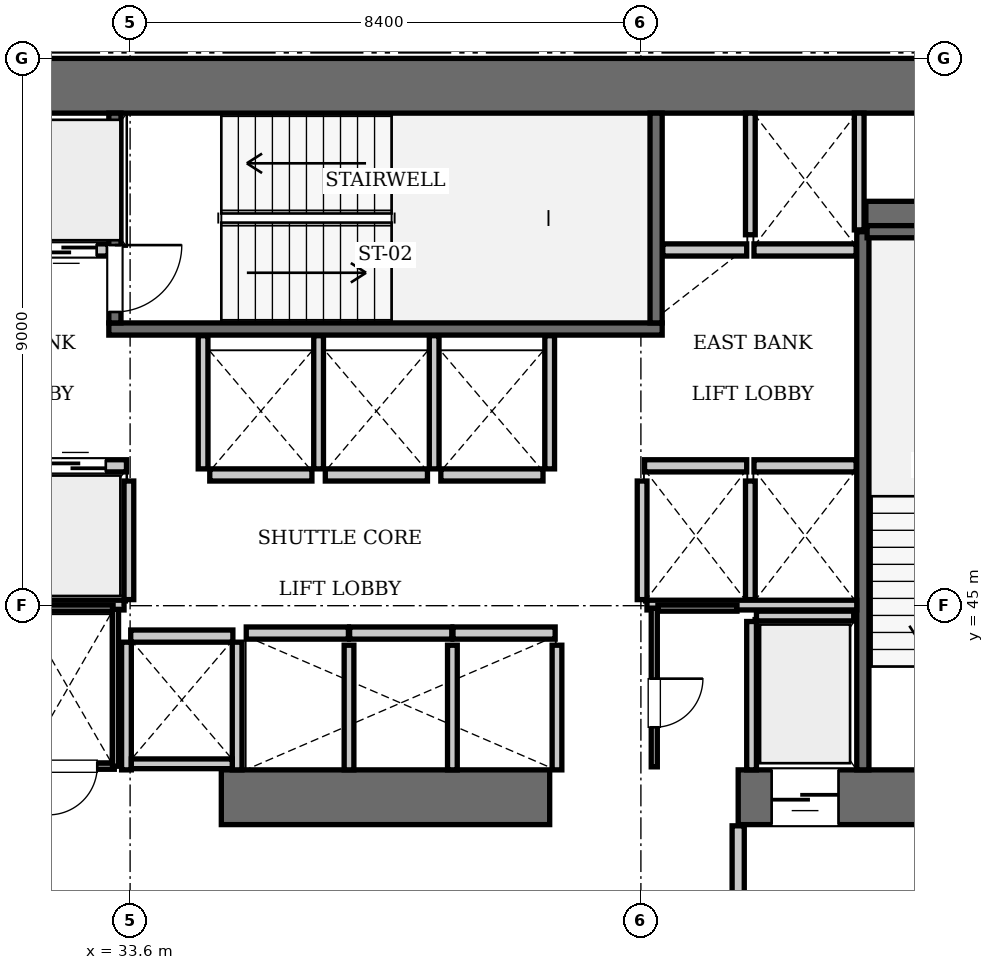
"""IFC4 building model, lengths in metres.
Left out: names, types, materials, properties, quantities, classifications, styles, units other than length and angle.
Written with IfcOpenShell. Run it as: python <this file> out.ifc"""

import sys

from ifc_helpers import new_model, si_unit, direction, frame, frame_2d, origin, place, context, subcontext, project, spatial, rectangle, extrude, element, fill, save


model = new_model("IFC4")
c1 = context("Model", 3, precision=1e-05, world=origin(), true_north=direction((0.0, 1.0)))
c2 = subcontext(c1, "Body", "Model", "MODEL_VIEW")
j1 = project(units=[si_unit("LENGTHUNIT", "METRE"), si_unit("PLANEANGLEUNIT", "RADIAN")], contexts=[c1])
p1 = place(None, origin())
s1 = spatial("IfcSite", under=j1, at=p1, CompositionType="ELEMENT")
p2 = place(p1, origin())
s2 = spatial("IfcBuilding", under=s1, at=p2, CompositionType="ELEMENT")
p3 = place(p2, frame((0.0, 0.0, 103.95)))
s3 = spatial("IfcBuildingStorey", under=s2, at=p3, CompositionType="ELEMENT", Elevation=103.95)
p4 = place(p3, frame((25.2, 53.55, 0.0), z_axis=(0.0, 0.0, 1.0), x_axis=(1.0, 0.0, 0.0)))
e1 = element("IfcWall", 1, at=p4, inside=s3, PredefinedType="SHEAR", context=c2, shape_type="SweptSolid", body=[
    extrude(rectangle(XDim=25.2, YDim=0.9, at=frame_2d((12.6, 0.0))), origin(), (0.0, 0.0, 1.0), 3.85),
])
p5 = place(p3, frame((35.1, 41.85, 0.0), z_axis=(0.0, 0.0, 1.0), x_axis=(1.0, 0.0, 0.0)))
e2 = element("IfcWall", 2, at=p5, inside=s3, PredefinedType="SHEAR", context=c2, shape_type="SweptSolid", body=[
    extrude(rectangle(XDim=5.4, YDim=0.9, at=frame_2d((2.7, 0.0))), origin(), (0.0, 0.0, 1.0), 3.85),
])
p6 = place(p3, frame((43.6, 41.85, 0.0), z_axis=(0.0, 0.0, 1.0), x_axis=(1.0, 0.0, 0.0)))
e3 = element("IfcWall", 3, at=p6, inside=s3, PredefinedType="SHEAR", context=c2, shape_type="SweptSolid", body=[
    extrude(rectangle(XDim=6.8, YDim=0.9, at=frame_2d((3.4, 0.0))), origin(), (0.0, 0.0, 1.0), 3.85),
])
p7 = place(p6, frame((3.9, 0.0, 0.0)))
e4 = element("IfcOpeningElement", 4, at=p7, cuts=e3, PredefinedType="OPENING", context=c2, shape_type="SweptSolid", body=[
    extrude(rectangle(XDim=1.15, YDim=2.15, at=frame_2d((0.575, 1.075))), frame((0.0, 0.46, 0.0), z_axis=(0.0, -1.0, 0.0), x_axis=(1.0, 0.0, 0.0)), (0.0, 0.0, 1.0), 0.92),
])
p8 = place(p6, frame((0.55, 0.0, 0.0)))
e5 = element("IfcOpeningElement", 5, at=p8, cuts=e3, PredefinedType="OPENING", context=c2, shape_type="SweptSolid", body=[
    extrude(rectangle(XDim=1.1, YDim=2.2, at=frame_2d((0.55, 1.1))), frame((0.0, 0.46, 0.0), z_axis=(0.0, -1.0, 0.0), x_axis=(1.0, 0.0, 0.0)), (0.0, 0.0, 1.0), 0.92),
])
p9 = place(p3, frame((45.7, 51.4, 0.0), z_axis=(0.0, 0.0, 1.0), x_axis=(1.0, 0.0, 0.0)))
e6 = element("IfcWall", 6, at=p9, inside=s3, PredefinedType="SHEAR", context=c2, shape_type="SweptSolid", body=[
    extrude(rectangle(XDim=3.8, YDim=0.5, at=frame_2d((1.9, 0.0))), origin(), (0.0, 0.0, 1.0), 3.85),
])
p10 = place(p3, frame((33.25, 49.55, 0.0), z_axis=(0.0, 0.0, 1.0), x_axis=(1.0, 0.0, 0.0)))
e7 = element("IfcWall", 7, at=p10, inside=s3, PredefinedType="SOLIDWALL", context=c2, shape_type="SweptSolid", body=[
    extrude(rectangle(XDim=9.1, YDim=0.2, at=frame_2d((4.55, 0.0))), origin(), (0.0, 0.0, 1.0), 3.61),
])
p11 = place(p3, frame((42.25, 49.65, 0.0), z_axis=(0.0, 0.0, 1.0), x_axis=(0.0, 1.0, 0.0)))
e8 = element("IfcWall", 8, at=p11, inside=s3, PredefinedType="SOLIDWALL", context=c2, shape_type="SweptSolid", body=[
    extrude(rectangle(XDim=3.45, YDim=0.2, at=frame_2d((1.725, 0.0))), origin(), (0.0, 0.0, 1.0), 3.61),
])
p12 = place(p3, frame((33.35, 49.65, 0.0), z_axis=(0.0, 0.0, 1.0), x_axis=(0.0, 1.0, 0.0)))
e9 = element("IfcWall", 9, at=p12, inside=s3, PredefinedType="SOLIDWALL", context=c2, shape_type="SweptSolid", body=[
    extrude(rectangle(XDim=3.45, YDim=0.2, at=frame_2d((1.725, 0.0))), origin(), (0.0, 0.0, 1.0), 3.61),
])
p13 = place(p12, frame((0.18, 0.0, 0.0)))
e10 = element("IfcOpeningElement", 10, at=p13, cuts=e9, PredefinedType="OPENING", context=c2, shape_type="SweptSolid", body=[
    extrude(rectangle(XDim=1.1, YDim=2.15, at=frame_2d((0.55, 1.075))), frame((0.0, 0.11, 0.0), z_axis=(0.0, -1.0, 0.0), x_axis=(1.0, 0.0, 0.0)), (0.0, 0.0, 1.0), 0.22),
])
p14 = place(p3, frame((45.65, 42.3, 0.0), z_axis=(0.0, 0.0, 1.0), x_axis=(0.0, 1.0, 0.0)))
e11 = element("IfcWall", 11, at=p14, inside=s3, PredefinedType="SOLIDWALL", context=c2, shape_type="SweptSolid", body=[
    extrude(rectangle(XDim=8.85, YDim=0.2, at=frame_2d((4.425, 0.0))), origin(), (0.0, 0.0, 1.0), 3.61),
])
p15 = place(p3, frame((45.72, 51.15, 0.0), z_axis=(0.0, 0.0, 1.0), x_axis=(1.0, 0.0, 0.0)))
e12 = element("IfcWall", 12, at=p15, inside=s3, PredefinedType="SOLIDWALL", context=c2, shape_type="SweptSolid", body=[
    extrude(rectangle(XDim=3.5, YDim=0.2, at=frame_2d((1.75, 0.0))), origin(), (0.0, 0.0, 1.0), 3.61),
])
p16 = place(p3, frame((31.86, 47.3, 0.0), z_axis=(0.0, 0.0, 1.0), x_axis=(1.0, 0.0, 0.0)))
e13 = element("IfcWall", 13, at=p16, inside=s3, PredefinedType="SOLIDWALL", context=c2, shape_type="SweptSolid", body=[
    extrude(rectangle(XDim=1.68, YDim=0.2, at=frame_2d((0.84, 0.0))), origin(), (0.0, 0.0, 1.0), 3.61),
])
p17 = place(p16, frame((0.34, 0.0, 0.0)))
e14 = element("IfcOpeningElement", 14, at=p17, cuts=e13, PredefinedType="OPENING", context=c2, shape_type="SweptSolid", body=[
    extrude(rectangle(XDim=1.0, YDim=2.15, at=frame_2d((0.5, 1.075))), frame((0.0, 0.11, 0.0), z_axis=(0.0, -1.0, 0.0), x_axis=(1.0, 0.0, 0.0)), (0.0, 0.0, 1.0), 0.22),
])
p18 = place(p3, frame((31.86, 50.85, 0.0), z_axis=(0.0, 0.0, 1.0), x_axis=(1.0, 0.0, 0.0)))
e15 = element("IfcWall", 15, at=p18, inside=s3, PredefinedType="SOLIDWALL", context=c2, shape_type="SweptSolid", body=[
    extrude(rectangle(XDim=1.38, YDim=0.2, at=frame_2d((0.69, 0.0))), origin(), (0.0, 0.0, 1.0), 3.61),
])
p19 = place(p18, frame((0.19, 0.0, 0.0)))
e16 = element("IfcOpeningElement", 16, at=p19, cuts=e15, PredefinedType="OPENING", context=c2, shape_type="SweptSolid", body=[
    extrude(rectangle(XDim=1.0, YDim=2.15, at=frame_2d((0.5, 1.075))), frame((0.0, 0.11, 0.0), z_axis=(0.0, -1.0, 0.0), x_axis=(1.0, 0.0, 0.0)), (0.0, 0.0, 1.0), 0.22),
])
for number, where, z_axis, x_axis in (
    (17, (42.06, 47.3, 0.0), (0.0, 0.0, 1.0), (1.0, 0.0, 0.0)),
    (18, (43.86, 47.3, 0.0), (0.0, 0.0, 1.0), (1.0, 0.0, 0.0)),
):
    element("IfcWall", number, at=place(p3, frame(where, z_axis=z_axis, x_axis=x_axis)), inside=s3, PredefinedType="SOLIDWALL", context=c2, shape_type="SweptSolid", body=[
        extrude(rectangle(XDim=1.68, YDim=0.2, at=frame_2d((0.84, 0.0))), origin(), (0.0, 0.0, 1.0), 3.61),
    ])
p20 = place(p3, frame((42.36, 50.85, 0.0), z_axis=(0.0, 0.0, 1.0), x_axis=(1.0, 0.0, 0.0)))
e19 = element("IfcWall", 19, at=p20, inside=s3, PredefinedType="SOLIDWALL", context=c2, shape_type="SweptSolid", body=[
    extrude(rectangle(XDim=1.38, YDim=0.2, at=frame_2d((0.69, 0.0))), origin(), (0.0, 0.0, 1.0), 3.61),
])
for number, where, z_axis, x_axis in (
    (20, (43.86, 50.85, 0.0), (0.0, 0.0, 1.0), (1.0, 0.0, 0.0)),
    (21, (35.51, 44.55, 0.0), (0.0, 0.0, 1.0), (1.0, 0.0, 0.0)),
    (22, (37.21, 44.55, 0.0), (0.0, 0.0, 1.0), (1.0, 0.0, 0.0)),
):
    element("IfcWall", number, at=place(p3, frame(where, z_axis=z_axis, x_axis=x_axis)), inside=s3, PredefinedType="SOLIDWALL", context=c2, shape_type="SweptSolid", body=[
        extrude(rectangle(XDim=1.68, YDim=0.2, at=frame_2d((0.84, 0.0))), origin(), (0.0, 0.0, 1.0), 3.61),
    ])
for number, where, z_axis, x_axis in (
    (23, (38.91, 44.55, 0.0), (0.0, 0.0, 1.0), (1.0, 0.0, 0.0)),
    (24, (34.91, 47.15, 0.0), (0.0, 0.0, 1.0), (1.0, 0.0, 0.0)),
):
    element("IfcWall", number, at=place(p3, frame(where, z_axis=z_axis, x_axis=x_axis)), inside=s3, PredefinedType="SOLIDWALL", context=c2, shape_type="SweptSolid", body=[
        extrude(rectangle(XDim=1.68, YDim=0.2, at=frame_2d((0.84, 0.0))), origin(), (0.0, 0.0, 1.0), 3.61),
    ])
for number, where, z_axis, x_axis in (
    (25, (36.81, 47.15, 0.0), (0.0, 0.0, 1.0), (1.0, 0.0, 0.0)),
    (26, (38.71, 47.15, 0.0), (0.0, 0.0, 1.0), (1.0, 0.0, 0.0)),
    (27, (33.61, 44.5, 0.0), (0.0, 0.0, 1.0), (1.0, 0.0, 0.0)),
):
    element("IfcWall", number, at=place(p3, frame(where, z_axis=z_axis, x_axis=x_axis)), inside=s3, PredefinedType="SOLIDWALL", context=c2, shape_type="SweptSolid", body=[
        extrude(rectangle(XDim=1.68, YDim=0.2, at=frame_2d((0.84, 0.0))), origin(), (0.0, 0.0, 1.0), 3.61),
    ])
p21 = place(p3, frame((43.9, 44.83, 0.0), z_axis=(0.0, 0.0, 1.0), x_axis=(1.0, 0.0, 0.0)))
e28 = element("IfcWall", 28, at=p21, inside=s3, PredefinedType="SOLIDWALL", context=c2, shape_type="SweptSolid", body=[
    extrude(rectangle(XDim=1.6, YDim=0.16, at=frame_2d((0.8, 0.0))), origin(), (0.0, 0.0, 1.0), 3.61),
])
p22 = place(p3, frame((43.82, 42.3, 0.0), z_axis=(0.0, 0.0, 1.0), x_axis=(0.0, 1.0, 0.0)))
e29 = element("IfcWall", 29, at=p22, inside=s3, PredefinedType="SOLIDWALL", context=c2, shape_type="SweptSolid", body=[
    extrude(rectangle(XDim=2.44, YDim=0.16, at=frame_2d((1.22, 0.0))), origin(), (0.0, 0.0, 1.0), 3.61),
])
p23 = place(p3, frame((33.58, 45.1, 0.0), z_axis=(0.0, 0.0, 1.0), x_axis=(0.0, 1.0, 0.0)))
e30 = element("IfcWall", 30, at=p23, inside=s3, PredefinedType="SOLIDWALL", context=c2, shape_type="SweptSolid", body=[
    extrude(rectangle(XDim=1.95, YDim=0.16, at=frame_2d((0.975, 0.0))), origin(), (0.0, 0.0, 1.0), 3.61),
])
p24 = place(p3, frame((30.05, 45.01, 0.0), z_axis=(0.0, 0.0, 1.0), x_axis=(1.0, 0.0, 0.0)))
e31 = element("IfcWall", 31, at=p24, inside=s3, PredefinedType="SOLIDWALL", context=c2, shape_type="SweptSolid", body=[
    extrude(rectangle(XDim=3.45, YDim=0.16, at=frame_2d((1.725, 0.0))), origin(), (0.0, 0.0, 1.0), 3.61),
])
for number, where, z_axis, x_axis in (
    (32, (42.02, 45.1, 0.0), (0.0, 0.0, 1.0), (0.0, 1.0, 0.0)),
    (33, (43.8, 45.1, 0.0), (0.0, 0.0, 1.0), (0.0, 1.0, 0.0)),
):
    element("IfcWall", number, at=place(p3, frame(where, z_axis=z_axis, x_axis=x_axis)), inside=s3, PredefinedType="SOLIDWALL", context=c2, shape_type="SweptSolid", body=[
        extrude(rectangle(XDim=1.95, YDim=0.16, at=frame_2d((0.975, 0.0))), origin(), (0.0, 0.0, 1.0), 3.61),
    ])
p25 = place(p3, frame((42.1, 45.01, 0.0), z_axis=(0.0, 0.0, 1.0), x_axis=(1.0, 0.0, 0.0)))
e34 = element("IfcWall", 34, at=p25, inside=s3, PredefinedType="SOLIDWALL", context=c2, shape_type="SweptSolid", body=[
    extrude(rectangle(XDim=3.45, YDim=0.16, at=frame_2d((1.725, 0.0))), origin(), (0.0, 0.0, 1.0), 3.61),
])
p26 = place(p3, frame((45.59, 51.18, 0.0), z_axis=(0.0, 0.0, 1.0), x_axis=(0.0, 1.0, 0.0)))
e35 = element("IfcWall", 35, at=p26, inside=s3, PredefinedType="SOLIDWALL", context=c2, shape_type="SweptSolid", body=[
    extrude(rectangle(XDim=1.92, YDim=0.16, at=frame_2d((0.96, 0.0))), origin(), (0.0, 0.0, 1.0), 3.61),
])
p27 = place(p3, frame((43.8, 51.1, 0.0), z_axis=(0.0, 0.0, 1.0), x_axis=(0.0, 1.0, 0.0)))
e36 = element("IfcWall", 36, at=p27, inside=s3, PredefinedType="SOLIDWALL", context=c2, shape_type="SweptSolid", body=[
    extrude(rectangle(XDim=2.0, YDim=0.16, at=frame_2d((1.0, 0.0))), origin(), (0.0, 0.0, 1.0), 3.61),
])
for number, where, z_axis, x_axis in (
    (37, (37.2, 42.3, 0.0), (0.0, 0.0, 1.0), (0.0, 1.0, 0.0)),
    (38, (38.9, 42.3, 0.0), (0.0, 0.0, 1.0), (0.0, 1.0, 0.0)),
    (39, (40.62, 42.3, 0.0), (0.0, 0.0, 1.0), (0.0, 1.0, 0.0)),
):
    element("IfcWall", number, at=place(p3, frame(where, z_axis=z_axis, x_axis=x_axis)), inside=s3, PredefinedType="SOLIDWALL", context=c2, shape_type="SweptSolid", body=[
        extrude(rectangle(XDim=2.05, YDim=0.16, at=frame_2d((1.025, 0.0))), origin(), (0.0, 0.0, 1.0), 3.61),
    ])
for number, where, z_axis, x_axis in (
    (40, (34.8, 47.25, 0.0), (0.0, 0.0, 1.0), (0.0, 1.0, 0.0)),
    (41, (36.7, 47.25, 0.0), (0.0, 0.0, 1.0), (0.0, 1.0, 0.0)),
    (42, (38.6, 47.25, 0.0), (0.0, 0.0, 1.0), (0.0, 1.0, 0.0)),
    (43, (40.5, 47.25, 0.0), (0.0, 0.0, 1.0), (0.0, 1.0, 0.0)),
):
    element("IfcWall", number, at=place(p3, frame(where, z_axis=z_axis, x_axis=x_axis)), inside=s3, PredefinedType="SOLIDWALL", context=c2, shape_type="SweptSolid", body=[
        extrude(rectangle(XDim=2.19, YDim=0.16, at=frame_2d((1.095, 0.0))), origin(), (0.0, 0.0, 1.0), 3.61),
    ])
for number, where, z_axis, x_axis in (
    (44, (33.54, 42.3, 0.0), (0.0, 0.0, 1.0), (0.0, 1.0, 0.0)),
    (45, (35.36, 42.3, 0.0), (0.0, 0.0, 1.0), (0.0, 1.0, 0.0)),
):
    element("IfcWall", number, at=place(p3, frame(where, z_axis=z_axis, x_axis=x_axis)), inside=s3, PredefinedType="SOLIDWALL", context=c2, shape_type="SweptSolid", body=[
        extrude(rectangle(XDim=2.1, YDim=0.16, at=frame_2d((1.05, 0.0))), origin(), (0.0, 0.0, 1.0), 3.61),
    ])
p28 = place(p3, frame((33.62, 42.4, 0.0), z_axis=(0.0, 0.0, 1.0), x_axis=(1.0, 0.0, 0.0)))
e46 = element("IfcWall", 46, at=p28, inside=s3, PredefinedType="SOLIDWALL", context=c2, shape_type="SweptSolid", body=[
    extrude(rectangle(XDim=1.66, YDim=0.16, at=frame_2d((0.83, 0.0))), origin(), (0.0, 0.0, 1.0), 3.61),
])
p29 = place(p3, frame((43.6, 38.31, 0.0), z_axis=(0.0, 0.0, 1.0), x_axis=(0.0, 1.0, 0.0)))
e47 = element("IfcWall", 47, at=p29, inside=s3, PredefinedType="PARTITIONING", context=c2, shape_type="SweptSolid", body=[
    extrude(rectangle(XDim=3.07, YDim=0.2, at=frame_2d((1.535, 0.0))), origin(), (0.0, 0.0, 1.0), 3.61),
])
p30 = place(p3, frame((32.02, 42.36, 0.0), z_axis=(0.0, 0.0, 1.0), x_axis=(1.0, 0.0, 0.0)))
e48 = element("IfcWall", 48, at=p30, inside=s3, PredefinedType="PARTITIONING", context=c2, shape_type="SweptSolid", body=[
    extrude(rectangle(XDim=1.32, YDim=0.1, at=frame_2d((0.66, 0.0))), origin(), (0.0, 0.0, 1.0), 3.61),
])
p31 = place(p30, frame((0.24, 0.0, 0.0)))
e49 = element("IfcOpeningElement", 49, at=p31, cuts=e48, PredefinedType="OPENING", context=c2, shape_type="SweptSolid", body=[
    extrude(rectangle(XDim=0.8, YDim=2.05, at=frame_2d((0.4, 1.025))), frame((0.0, 0.06, 0.0), z_axis=(0.0, -1.0, 0.0), x_axis=(1.0, 0.0, 0.0)), (0.0, 0.0, 1.0), 0.12),
])
p32 = place(p3, frame((31.84, 44.96, 0.0), z_axis=(0.0, 0.0, 1.0), x_axis=(1.0, 0.0, 0.0)))
e50 = element("IfcWall", 50, at=p32, inside=s3, PredefinedType="PARTITIONING", context=c2, shape_type="SweptSolid", body=[
    extrude(rectangle(XDim=1.48, YDim=0.1, at=frame_2d((0.74, 0.0))), origin(), (0.0, 0.0, 1.0), 3.61),
])
p33 = place(p3, frame((33.36, 42.36, 0.0), z_axis=(0.0, 0.0, 1.0), x_axis=(0.0, 1.0, 0.0)))
e51 = element("IfcWall", 51, at=p33, inside=s3, PredefinedType="PARTITIONING", context=c2, shape_type="SweptSolid", body=[
    extrude(rectangle(XDim=2.58, YDim=0.1, at=frame_2d((1.29, 0.0))), origin(), (0.0, 0.0, 1.0), 3.61),
])
p34 = place(p3, frame((42.22, 42.35, 0.0), z_axis=(0.0, 0.0, 1.0), x_axis=(0.0, 1.0, 0.0)))
e52 = element("IfcWall", 52, at=p34, inside=s3, PredefinedType="PARTITIONING", context=c2, shape_type="SweptSolid", body=[
    extrude(rectangle(XDim=2.61, YDim=0.1, at=frame_2d((1.305, 0.0))), origin(), (0.0, 0.0, 1.0), 3.61),
])
p35 = place(p34, frame((0.65, 0.0, 0.0)))
e53 = element("IfcOpeningElement", 53, at=p35, cuts=e52, PredefinedType="OPENING", context=c2, shape_type="SweptSolid", body=[
    extrude(rectangle(XDim=0.8, YDim=2.05, at=frame_2d((0.4, 1.025))), frame((0.0, 0.06, 0.0), z_axis=(0.0, -1.0, 0.0), x_axis=(1.0, 0.0, 0.0)), (0.0, 0.0, 1.0), 0.12),
])
p36 = place(p3, frame((42.28, 44.96, 0.0), z_axis=(0.0, 0.0, 1.0), x_axis=(1.0, 0.0, 0.0)))
e54 = element("IfcWall", 54, at=p36, inside=s3, PredefinedType="PARTITIONING", context=c2, shape_type="SweptSolid", body=[
    extrude(rectangle(XDim=1.3, YDim=0.1, at=frame_2d((0.65, 0.0))), origin(), (0.0, 0.0, 1.0), 3.61),
])
p37 = place(p13, frame((1.1, 0.0, 0.0), z_axis=(0.0, 0.0, 1.0), x_axis=(-1.0, 0.0, 0.0)))
e55 = element("IfcDoor", 55, at=p37, inside=s3, OperationType="SINGLE_SWING_LEFT", PredefinedType="DOOR", context=c2, shape_type="SweptSolid", body=[
    extrude(rectangle(XDim=1.1, YDim=2.15, at=frame_2d((0.55, 1.075))), frame((0.0, 0.025, 0.0), z_axis=(0.0, -1.0, 0.0), x_axis=(1.0, 0.0, 0.0)), (0.0, 0.0, 1.0), 0.05),
])
fill(e10, e55)
p38 = place(p17, origin())
e56 = element("IfcDoor", 56, at=p38, inside=s3, OperationType="SLIDING_TO_LEFT", PredefinedType="DOOR", context=c2, shape_type="SweptSolid", body=[
    extrude(rectangle(XDim=1.0, YDim=2.15, at=frame_2d((0.5, 1.075))), frame((0.0, 0.025, 0.0), z_axis=(0.0, -1.0, 0.0), x_axis=(1.0, 0.0, 0.0)), (0.0, 0.0, 1.0), 0.05),
])
fill(e14, e56)
p39 = place(p19, frame((1.0, 0.0, 0.0), z_axis=(0.0, 0.0, 1.0), x_axis=(-1.0, 0.0, 0.0)))
e57 = element("IfcDoor", 57, at=p39, inside=s3, OperationType="SLIDING_TO_LEFT", PredefinedType="DOOR", context=c2, shape_type="SweptSolid", body=[
    extrude(rectangle(XDim=1.0, YDim=2.15, at=frame_2d((0.5, 1.075))), frame((0.0, 0.025, 0.0), z_axis=(0.0, -1.0, 0.0), x_axis=(1.0, 0.0, 0.0)), (0.0, 0.0, 1.0), 0.05),
])
fill(e16, e57)
p40 = place(p8, frame((1.1, 0.0, 0.0), z_axis=(0.0, 0.0, 1.0), x_axis=(-1.0, 0.0, 0.0)))
e58 = element("IfcDoor", 58, at=p40, inside=s3, OperationType="SLIDING_TO_LEFT", PredefinedType="DOOR", context=c2, shape_type="SweptSolid", body=[
    extrude(rectangle(XDim=1.1, YDim=2.2, at=frame_2d((0.55, 1.1))), frame((0.0, 0.025, 0.0), z_axis=(0.0, -1.0, 0.0), x_axis=(1.0, 0.0, 0.0)), (0.0, 0.0, 1.0), 0.05),
])
fill(e5, e58)
p41 = place(p31, frame((0.8, 0.0, 0.0), z_axis=(0.0, 0.0, 1.0), x_axis=(-1.0, 0.0, 0.0)))
e59 = element("IfcDoor", 59, at=p41, inside=s3, OperationType="SINGLE_SWING_RIGHT", PredefinedType="DOOR", context=c2, shape_type="SweptSolid", body=[
    extrude(rectangle(XDim=0.8, YDim=2.05, at=frame_2d((0.4, 1.025))), frame((0.0, 0.025, 0.0), z_axis=(0.0, -1.0, 0.0), x_axis=(1.0, 0.0, 0.0)), (0.0, 0.0, 1.0), 0.05),
])
fill(e49, e59)
p42 = place(p35, frame((0.8, 0.0, 0.0), z_axis=(0.0, 0.0, 1.0), x_axis=(-1.0, 0.0, 0.0)))
e60 = element("IfcDoor", 60, at=p42, inside=s3, OperationType="SINGLE_SWING_LEFT", PredefinedType="DOOR", context=c2, shape_type="SweptSolid", body=[
    extrude(rectangle(XDim=0.8, YDim=2.05, at=frame_2d((0.4, 1.025))), frame((0.0, 0.025, 0.0), z_axis=(0.0, -1.0, 0.0), x_axis=(1.0, 0.0, 0.0)), (0.0, 0.0, 1.0), 0.05),
])
fill(e53, e60)
save(model, sys.argv[1])
